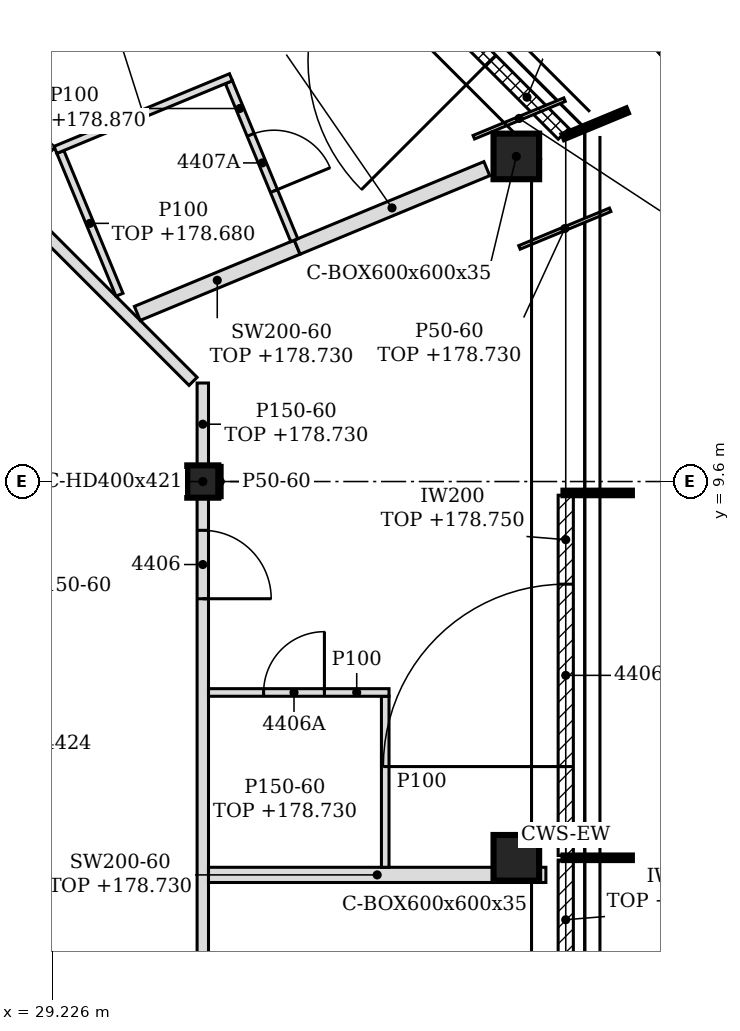
"""IFC4 building model, lengths in metres.
Left out: names, types, materials, properties, quantities, classifications, styles, units other than length and angle.
Written with IfcOpenShell. Run it as: python <this file> out.ifc"""

import sys

from ifc_helpers import new_model, si_unit, direction, frame, frame_2d, origin, origin_2d, place, context, subcontext, project, spatial, polyline, rectangle, hollow_rectangle, i_section, outline, extrude, clip, halfspace, element, fill, save


model = new_model("IFC4")
c1 = context("Model", 3, precision=1e-05, world=origin(), true_north=direction((0.0, 1.0)))
c2 = subcontext(c1, "Body", "Model", "MODEL_VIEW")
j1 = project(units=[si_unit("LENGTHUNIT", "METRE"), si_unit("PLANEANGLEUNIT", "RADIAN")], contexts=[c1])
p1 = place(None, origin())
s1 = spatial("IfcSite", under=j1, at=p1, CompositionType="ELEMENT")
p2 = place(p1, origin())
s2 = spatial("IfcBuilding", under=s1, at=p2, CompositionType="ELEMENT")
p3 = place(p2, frame((0.0, 0.0, 175.8)))
s3 = spatial("IfcBuildingStorey", under=s2, at=p3, CompositionType="ELEMENT", Elevation=175.8)
for number, where, z_axis, x_axis in (
    (1, (35.325, 4.65, -0.15), (0.183, -0.122, 0.976), (0.555, 0.832, 0.0)),
    (2, (35.325, 13.877, -0.15), (0.183, -0.122, 0.976), (0.555, 0.832, 0.0)),
):
    element("IfcColumn", number, at=place(p3, frame(where, z_axis=z_axis, x_axis=x_axis)), inside=s3, PredefinedType="COLUMN", context=c2, shape_type="Clipping", body=[
        clip(clip(extrude(hollow_rectangle(XDim=0.6, YDim=0.6, WallThickness=0.035, at=origin_2d()), origin(), (0.0, 0.0, 1.0), 3.69), halfspace(frame((0.0, 0.0, 0.022), z_axis=(0.0, 0.0, 1.0), x_axis=(1.0, 0.0, 0.0)), True)), halfspace(frame((0.0, 0.0, 3.67), z_axis=(0.0, 0.0, 1.0), x_axis=(1.0, 0.0, 0.0)), False)),
    ])
p4 = place(p3, frame((31.2, 9.6, -0.15), z_axis=(0.0, 0.0, 1.0), x_axis=(1.0, 0.0, 0.0)))
e3 = element("IfcColumn", 3, at=p4, inside=s3, PredefinedType="COLUMN", context=c2, shape_type="SweptSolid", body=[
    extrude(i_section(OverallWidth=0.409, OverallDepth=0.425, WebThickness=0.033, FlangeThickness=0.052, FilletRadius=0.015, at=origin_2d()), origin(), (0.0, 0.0, 1.0), 3.6),
])
p5 = place(p3, frame((35.975, -0.12, 0.0), z_axis=(0.0, 0.0, 1.0), x_axis=(0.0, 1.0, 0.0)))
e4 = element("IfcWall", 4, at=p5, inside=s3, PredefinedType="NOTDEFINED", context=c2, shape_type="SweptSolid", body=[
    extrude(rectangle(XDim=4.74, YDim=0.2, at=frame_2d((2.37, 0.0))), origin(), (0.0, 0.0, 1.0), 2.95),
])
p6 = place(p5, frame((0.77, 0.0, 0.0)))
e5 = element("IfcOpeningElement", 5, at=p6, cuts=e4, PredefinedType="OPENING", context=c2, shape_type="SweptSolid", body=[
    extrude(rectangle(XDim=2.4, YDim=2.4, at=frame_2d((1.2, 1.2))), frame((0.0, 0.11, 0.0), z_axis=(0.0, -1.0, 0.0), x_axis=(1.0, 0.0, 0.0)), (0.0, 0.0, 1.0), 0.22),
])
p7 = place(p3, frame((35.975, 4.68, 0.0), z_axis=(0.0, 0.0, 1.0), x_axis=(0.0, 1.0, 0.0)))
e6 = element("IfcWall", 6, at=p7, inside=s3, PredefinedType="NOTDEFINED", context=c2, shape_type="SweptSolid", body=[
    extrude(rectangle(XDim=4.74, YDim=0.2, at=frame_2d((2.37, 0.0))), origin(), (0.0, 0.0, 1.0), 2.95),
])
p8 = place(p7, frame((1.17, 0.0, 0.0)))
e7 = element("IfcOpeningElement", 7, at=p8, cuts=e6, PredefinedType="OPENING", context=c2, shape_type="SweptSolid", body=[
    extrude(rectangle(XDim=2.4, YDim=2.4, at=frame_2d((1.2, 1.2))), frame((0.0, 0.11, 0.0), z_axis=(0.0, -1.0, 0.0), x_axis=(1.0, 0.0, 0.0)), (0.0, 0.0, 1.0), 0.22),
])
p9 = place(p3, frame((35.947, 14.175, 0.0), z_axis=(0.0, 0.0, 1.0), x_axis=(-0.707137595296, 0.707075965734, 0.0)))
e8 = element("IfcWall", 8, at=p9, inside=s3, PredefinedType="NOTDEFINED", context=c2, shape_type="SweptSolid", body=[
    extrude(rectangle(XDim=3.961, YDim=0.2, at=frame_2d((1.981, 0.0))), origin(), (0.0, 0.0, 1.0), 3.45),
])
p10 = place(p9, frame((1.362, 0.0, 0.0)))
e9 = element("IfcOpeningElement", 9, at=p10, cuts=e8, PredefinedType="OPENING", context=c2, shape_type="SweptSolid", body=[
    extrude(rectangle(XDim=2.4, YDim=2.4, at=frame_2d((1.2, 1.2))), frame((0.0, 0.11, 0.0), z_axis=(0.0, -1.0, 0.0), x_axis=(1.0, 0.0, 0.0)), (0.0, 0.0, 1.0), 0.22),
])
p11 = place(p3, frame((31.2, 0.387, 0.0), z_axis=(0.0, 0.0, 1.0), x_axis=(0.0, 1.0, 0.0)))
e10 = element("IfcWall", 10, at=p11, inside=s3, PredefinedType="PARTITIONING", context=c2, shape_type="SweptSolid", body=[
    extrude(rectangle(XDim=9.0, YDim=0.15, at=frame_2d((4.5, 0.0))), origin(), (0.0, 0.0, 1.0), 2.93),
])
p12 = place(p11, frame((1.478, 0.0, 0.0)))
e11 = element("IfcOpeningElement", 11, at=p12, cuts=e10, PredefinedType="OPENING", context=c2, shape_type="SweptSolid", body=[
    extrude(rectangle(XDim=0.9, YDim=2.1, at=frame_2d((0.45, 1.05))), frame((0.0, 0.085, 0.0), z_axis=(0.0, -1.0, 0.0), x_axis=(1.0, 0.0, 0.0)), (0.0, 0.0, 1.0), 0.17),
])
p13 = place(p11, frame((7.671, 0.0, 0.0)))
e12 = element("IfcOpeningElement", 12, at=p13, cuts=e10, PredefinedType="OPENING", context=c2, shape_type="SweptSolid", body=[
    extrude(rectangle(XDim=0.9, YDim=2.1, at=frame_2d((0.45, 1.05))), frame((0.0, 0.085, 0.0), z_axis=(0.0, -1.0, 0.0), x_axis=(1.0, 0.0, 0.0)), (0.0, 0.0, 1.0), 0.17),
])
p14 = place(p3, frame((31.275, 4.425, 0.0), z_axis=(0.0, 0.0, 1.0), x_axis=(1.0, 0.0, 0.0)))
e13 = element("IfcWall", 13, at=p14, inside=s3, PredefinedType="PARTITIONING", context=c2, shape_type="SweptSolid", body=[
    extrude(outline(polyline([(0.0, 0.0), (3.697, 0.0), (3.817, 0.863), (3.979, 1.725), (4.205, 2.587), (4.298, 2.93), (0.0, 2.93), (0.0, 2.587), (0.0, 1.725), (0.0, 0.863), (0.0, 0.0)])), frame((0.0, 0.1, 0.0), z_axis=(0.0, -1.0, 0.0), x_axis=(1.0, 0.0, 0.0)), (0.0, 0.0, 1.0), 0.2),
])
p15 = place(p3, frame((33.6, 4.525, 0.0), z_axis=(0.0, 0.0, 1.0), x_axis=(0.0, 1.0, 0.0)))
e14 = element("IfcWall", 14, at=p15, inside=s3, PredefinedType="PARTITIONING", context=c2, shape_type="SweptSolid", body=[
    extrude(rectangle(XDim=2.25, YDim=0.1, at=frame_2d((1.125, 0.0))), origin(), (0.0, 0.0, 1.0), 3.45),
])
p16 = place(p3, frame((31.275, 6.825, 0.0), z_axis=(0.0, 0.0, 1.0), x_axis=(1.0, 0.0, 0.0)))
e15 = element("IfcWall", 15, at=p16, inside=s3, PredefinedType="PARTITIONING", context=c2, shape_type="SweptSolid", body=[
    extrude(outline(polyline([(0.0, 0.0), (2.375, 0.0), (2.375, 3.45), (0.075, 3.45), (0.073, 2.93), (0.0, 2.93), (0.0, 0.0)])), frame((0.0, 0.05, 0.0), z_axis=(0.0, -1.0, 0.0), x_axis=(1.0, 0.0, 0.0)), (0.0, 0.0, 1.0), 0.1),
])
p17 = place(p16, frame((0.725, 0.0, 0.0)))
e16 = element("IfcOpeningElement", 16, at=p17, cuts=e15, PredefinedType="OPENING", context=c2, shape_type="SweptSolid", body=[
    extrude(rectangle(XDim=0.8, YDim=2.1, at=frame_2d((0.4, 1.05))), frame((0.0, 0.06, 0.0), z_axis=(0.0, -1.0, 0.0), x_axis=(1.0, 0.0, 0.0)), (0.0, 0.0, 1.0), 0.12),
])
p18 = place(p3, frame((31.2, 9.812, 0.0), z_axis=(0.0, 0.0, 1.0), x_axis=(0.0, 1.0, 0.0)))
e17 = element("IfcWall", 17, at=p18, inside=s3, PredefinedType="PARTITIONING", context=c2, shape_type="SweptSolid", body=[
    extrude(rectangle(XDim=1.083, YDim=0.15, at=frame_2d((0.542, 0.0))), origin(), (0.0, 0.0, 1.0), 2.93),
])
p19 = place(p3, frame((31.072, 10.918, 0.0), z_axis=(0.0, 0.0, 1.0), x_axis=(-0.707106781187, 0.707106781187, 0.0)))
e18 = element("IfcWall", 18, at=p19, inside=s3, PredefinedType="PARTITIONING", context=c2, shape_type="SweptSolid", body=[
    extrude(rectangle(XDim=16.452, YDim=0.15, at=frame_2d((8.226, 0.0))), origin(), (0.0, 0.0, 1.0), 2.88),
])
p20 = place(p19, frame((3.462, 0.0, 0.0)))
e19 = element("IfcOpeningElement", 19, at=p20, cuts=e18, PredefinedType="OPENING", context=c2, shape_type="SweptSolid", body=[
    extrude(rectangle(XDim=0.9, YDim=2.1, at=frame_2d((0.45, 1.05))), frame((0.0, 0.085, 0.0), z_axis=(0.0, -1.0, 0.0), x_axis=(1.0, 0.0, 0.0)), (0.0, 0.0, 1.0), 0.17),
])
p21 = place(p19, frame((8.046, 0.0, 0.0)))
e20 = element("IfcOpeningElement", 20, at=p21, cuts=e18, PredefinedType="OPENING", context=c2, shape_type="SweptSolid", body=[
    extrude(rectangle(XDim=0.9, YDim=2.1, at=frame_2d((0.45, 1.05))), frame((0.0, 0.085, 0.0), z_axis=(0.0, -1.0, 0.0), x_axis=(1.0, 0.0, 0.0)), (0.0, 0.0, 1.0), 0.17),
])
p22 = place(p19, frame((12.53, 0.0, 0.0)))
e21 = element("IfcOpeningElement", 21, at=p22, cuts=e18, PredefinedType="OPENING", context=c2, shape_type="SweptSolid", body=[
    extrude(rectangle(XDim=0.9, YDim=2.1, at=frame_2d((0.45, 1.05))), frame((0.0, 0.085, 0.0), z_axis=(0.0, -1.0, 0.0), x_axis=(1.0, 0.0, 0.0)), (0.0, 0.0, 1.0), 0.17),
])
p23 = place(p3, frame((30.338, 11.812, 0.0), z_axis=(0.0, 0.0, 1.0), x_axis=(0.923912287373, 0.38260434556, 0.0)))
e22 = element("IfcWall", 22, at=p23, inside=s3, PredefinedType="PARTITIONING", context=c2, shape_type="SweptSolid", body=[
    extrude(rectangle(XDim=2.277, YDim=0.2, at=frame_2d((1.138, 0.0))), origin(), (0.0, 0.0, 1.0), 2.93),
])
p24 = place(p3, frame((30.104, 12.058, 0.0), z_axis=(0.0, 0.0, 1.0), x_axis=(-0.382627570994, 0.92390266907, 0.0)))
e23 = element("IfcWall", 23, at=p24, inside=s3, PredefinedType="PARTITIONING", context=c2, shape_type="SweptSolid", body=[
    extrude(rectangle(XDim=2.033, YDim=0.1, at=frame_2d((1.017, 0.0))), origin(), (0.0, 0.0, 1.0), 2.88),
])
p25 = place(p3, frame((32.442, 12.683, 0.0), z_axis=(0.0, 0.0, 1.0), x_axis=(0.923906649102, 0.382617960563, 0.0)))
e24 = element("IfcWall", 24, at=p25, inside=s3, PredefinedType="PARTITIONING", context=c2, shape_type="SweptSolid", body=[
    extrude(rectangle(XDim=2.7, YDim=0.2, at=frame_2d((1.35, 0.0))), origin(), (0.0, 0.0, 1.0), 3.07),
])
p26 = place(p3, frame((32.404, 12.775, 0.0), z_axis=(0.0, 0.0, 1.0), x_axis=(-0.382572259818, 0.923925573852, 0.0)))
e25 = element("IfcWall", 25, at=p26, inside=s3, PredefinedType="PARTITIONING", context=c2, shape_type="SweptSolid", body=[
    extrude(rectangle(XDim=2.25, YDim=0.1, at=frame_2d((1.125, 0.0))), origin(), (0.0, 0.0, 1.0), 3.07),
])
p27 = place(p26, frame((0.7, 0.0, 0.0)))
e26 = element("IfcOpeningElement", 26, at=p27, cuts=e25, PredefinedType="OPENING", context=c2, shape_type="SweptSolid", body=[
    extrude(rectangle(XDim=0.8, YDim=2.1, at=frame_2d((0.4, 1.05))), frame((0.0, 0.06, 0.0), z_axis=(0.0, -1.0, 0.0), x_axis=(1.0, 0.0, 0.0)), (0.0, 0.0, 1.0), 0.12),
])
p28 = place(p3, frame((29.261, 13.963, 0.0), z_axis=(0.0, 0.0, 1.0), x_axis=(0.923929949387, 0.382561692574, 0.0)))
e27 = element("IfcWall", 27, at=p28, inside=s3, PredefinedType="PARTITIONING", context=c2, shape_type="SweptSolid", body=[
    extrude(rectangle(XDim=2.5, YDim=0.1, at=frame_2d((1.25, 0.0))), origin(), (0.0, 0.0, 1.0), 2.93),
])
p29 = place(p3, frame((27.429, 14.667, 0.0), z_axis=(0.0, 0.0, 1.0), x_axis=(0.707028369139, 0.70718518454, 0.0)))
e28 = element("IfcWall", 28, at=p29, inside=s3, PredefinedType="PARTITIONING", context=c2, shape_type="SweptSolid", body=[
    extrude(rectangle(XDim=4.671, YDim=0.2, at=frame_2d((2.335, 0.0))), origin(), (0.0, 0.0, 1.0), 3.45),
])
p30 = place(p3, frame((31.429, 9.387, 0.0), z_axis=(0.0, 0.0, 1.0), x_axis=(0.0, 1.0, 0.0)))
e29 = element("IfcWall", 29, at=p30, inside=s3, PredefinedType="PARTITIONING", context=c2, shape_type="SweptSolid", body=[
    extrude(rectangle(XDim=0.425, YDim=0.05, at=frame_2d((0.212, 0.0))), origin(), (0.0, 0.0, 1.0), 3.45),
])
for number, where, z_axis, x_axis in (
    (30, (35.366, 12.68, 0.0), (0.0, 0.0, 1.0), (0.924, 0.383, 0.0)),
    (31, (34.765, 14.13, 0.0), (0.0, 0.0, 1.0), (0.924, 0.383, 0.0)),
):
    element("IfcWall", number, at=place(p3, frame(where, z_axis=z_axis, x_axis=x_axis)), inside=s3, PredefinedType="PARTITIONING", context=c2, shape_type="SweptSolid", body=[
        extrude(rectangle(XDim=1.292, YDim=0.05, at=frame_2d((0.646, 0.0))), origin(), (0.0, 0.0, 1.0), 2.93),
    ])
p31 = place(p8, origin())
e32 = element("IfcDoor", 32, at=p31, inside=s3, OperationType="SINGLE_SWING_LEFT", PredefinedType="DOOR", context=c2, shape_type="SweptSolid", body=[
    extrude(rectangle(XDim=2.4, YDim=2.4, at=frame_2d((1.2, 1.2))), frame((0.0, 0.025, 0.0), z_axis=(0.0, -1.0, 0.0), x_axis=(1.0, 0.0, 0.0)), (0.0, 0.0, 1.0), 0.05),
])
fill(e7, e32)
p32 = place(p10, origin())
e33 = element("IfcDoor", 33, at=p32, inside=s3, OperationType="SINGLE_SWING_LEFT", PredefinedType="DOOR", context=c2, shape_type="SweptSolid", body=[
    extrude(rectangle(XDim=2.4, YDim=2.4, at=frame_2d((1.2, 1.2))), frame((0.0, 0.025, 0.0), z_axis=(0.0, -1.0, 0.0), x_axis=(1.0, 0.0, 0.0)), (0.0, 0.0, 1.0), 0.05),
])
fill(e9, e33)
p33 = place(p13, frame((0.9, 0.0, 0.0), z_axis=(0.0, 0.0, 1.0), x_axis=(-1.0, 0.0, 0.0)))
e34 = element("IfcDoor", 34, at=p33, inside=s3, OperationType="SINGLE_SWING_RIGHT", PredefinedType="DOOR", context=c2, shape_type="SweptSolid", body=[
    extrude(rectangle(XDim=0.9, YDim=2.1, at=frame_2d((0.45, 1.05))), frame((0.0, 0.025, 0.0), z_axis=(0.0, -1.0, 0.0), x_axis=(1.0, 0.0, 0.0)), (0.0, 0.0, 1.0), 0.05),
])
fill(e12, e34)
p34 = place(p17, origin())
e35 = element("IfcDoor", 35, at=p34, inside=s3, OperationType="SINGLE_SWING_RIGHT", PredefinedType="DOOR", context=c2, shape_type="SweptSolid", body=[
    extrude(rectangle(XDim=0.8, YDim=2.1, at=frame_2d((0.4, 1.05))), frame((0.0, 0.025, 0.0), z_axis=(0.0, -1.0, 0.0), x_axis=(1.0, 0.0, 0.0)), (0.0, 0.0, 1.0), 0.05),
])
fill(e16, e35)
p35 = place(p27, frame((0.8, 0.0, 0.0), z_axis=(0.0, 0.0, 1.0), x_axis=(-1.0, 0.0, 0.0)))
e36 = element("IfcDoor", 36, at=p35, inside=s3, OperationType="SINGLE_SWING_RIGHT", PredefinedType="DOOR", context=c2, shape_type="SweptSolid", body=[
    extrude(rectangle(XDim=0.8, YDim=2.1, at=frame_2d((0.4, 1.05))), frame((0.0, 0.025, 0.0), z_axis=(0.0, -1.0, 0.0), x_axis=(1.0, 0.0, 0.0)), (0.0, 0.0, 1.0), 0.05),
])
fill(e26, e36)
save(model, sys.argv[1])
